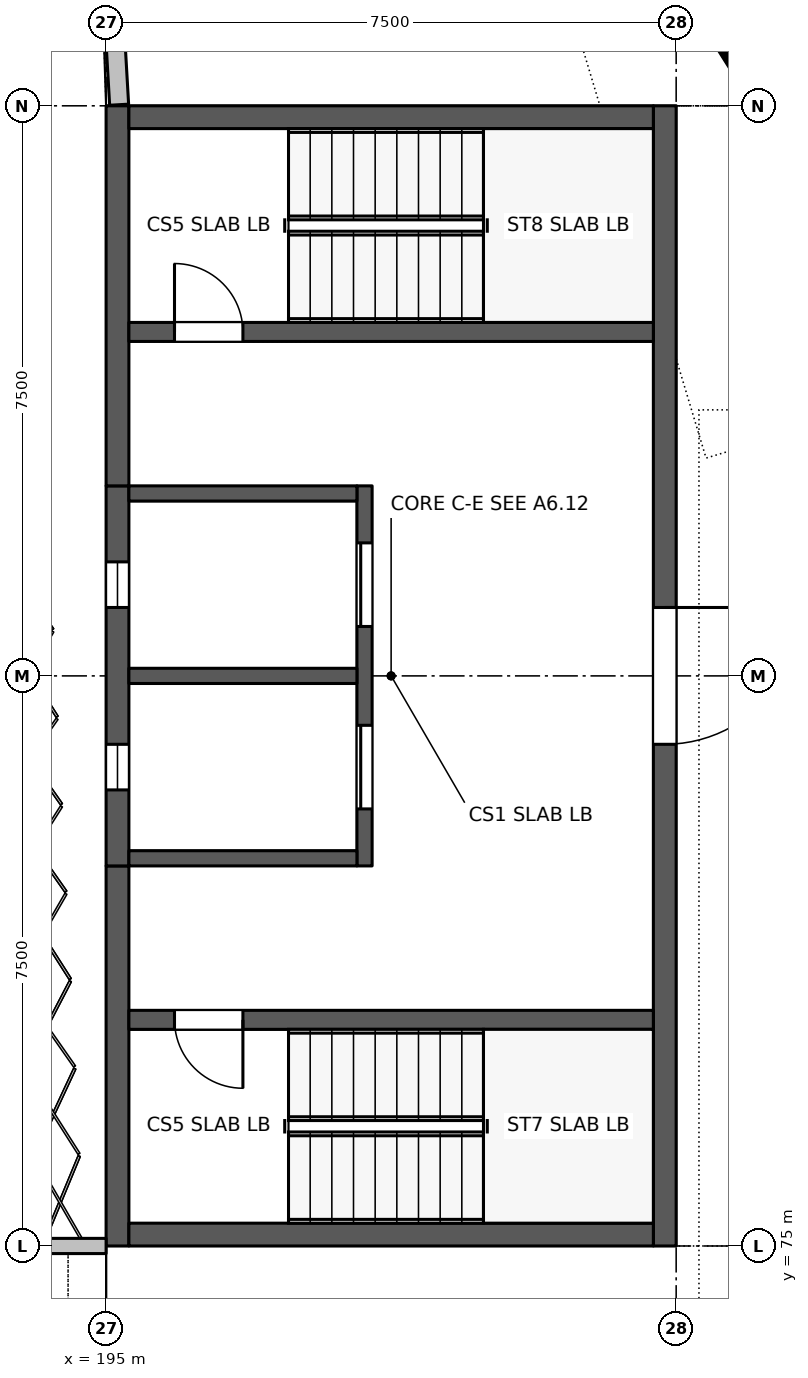
"""IFC4 building model, lengths in metres.
Left out: names, types, materials, properties, quantities, classifications, styles, units other than length and angle.
Written with IfcOpenShell. Run it as: python <this file> out.ifc"""

import sys

from ifc_helpers import new_model, si_unit, direction, frame, frame_2d, origin, place, context, subcontext, project, spatial, rectangle, extrude, element, fill, save


model = new_model("IFC4")
c1 = context("Model", 3, precision=1e-05, world=origin(), true_north=direction((0.0, 1.0)))
c2 = subcontext(c1, "Body", "Model", "MODEL_VIEW")
j1 = project(units=[si_unit("LENGTHUNIT", "METRE"), si_unit("PLANEANGLEUNIT", "RADIAN")], contexts=[c1])
p1 = place(None, origin())
s1 = spatial("IfcSite", under=j1, at=p1, CompositionType="ELEMENT")
p2 = place(p1, origin())
s2 = spatial("IfcBuilding", under=s1, at=p2, CompositionType="ELEMENT")
p3 = place(p2, frame((0.0, 0.0, 6.6)))
s3 = spatial("IfcBuildingStorey", under=s2, at=p3, CompositionType="ELEMENT", Elevation=6.6)
p4 = place(p3, frame((195.037, 92.356, 0.0), z_axis=(0.0, 0.0, 1.0), x_axis=(0.057361082086, -0.998353497646, 0.0)))
e1 = element("IfcWall", 1, at=p4, inside=s3, PredefinedType="SOLIDWALL", context=c2, shape_type="SweptSolid", body=[
    extrude(rectangle(XDim=2.345, YDim=0.25, at=frame_2d((1.173, 0.0))), origin(), (0.0, 0.0, 1.0), 1.1),
])
p5 = place(p3, frame((187.654, 75.0, 0.0), z_axis=(0.0, 0.0, 1.0), x_axis=(1.0, 0.0, 0.0)))
e2 = element("IfcWall", 2, at=p5, inside=s3, PredefinedType="SOLIDWALL", context=c2, shape_type="SweptSolid", body=[
    extrude(rectangle(XDim=7.346, YDim=0.2, at=frame_2d((3.673, 0.0))), origin(), (0.0, 0.0, 1.0), 2.627),
])
p6 = place(p5, frame((0.849, 0.0, 0.9)))
e3 = element("IfcOpeningElement", 3, at=p6, cuts=e2, PredefinedType="OPENING", context=c2, shape_type="SweptSolid", body=[
    extrude(rectangle(XDim=2.4, YDim=1.5, at=frame_2d((1.2, 0.75))), frame((0.0, 0.11, 0.0), z_axis=(0.0, -1.0, 0.0), x_axis=(1.0, 0.0, 0.0)), (0.0, 0.0, 1.0), 0.22),
])
p7 = place(p5, frame((4.098, 0.0, 0.9)))
e4 = element("IfcOpeningElement", 4, at=p7, cuts=e2, PredefinedType="OPENING", context=c2, shape_type="SweptSolid", body=[
    extrude(rectangle(XDim=2.4, YDim=1.5, at=frame_2d((1.2, 0.75))), frame((0.0, 0.11, 0.0), z_axis=(0.0, -1.0, 0.0), x_axis=(1.0, 0.0, 0.0)), (0.0, 0.0, 1.0), 0.22),
])
p8 = place(p3, frame((202.35, 90.0, 0.0), z_axis=(0.0, 0.0, 1.0), x_axis=(0.0, -1.0, 0.0)))
e5 = element("IfcWall", 5, at=p8, inside=s3, PredefinedType="SHEAR", context=c2, shape_type="SweptSolid", body=[
    extrude(rectangle(XDim=15.0, YDim=0.3, at=frame_2d((7.5, 0.0))), origin(), (0.0, 0.0, 1.0), 3.3),
])
p9 = place(p8, frame((6.6, 0.0, 0.0)))
e6 = element("IfcOpeningElement", 6, at=p9, cuts=e5, PredefinedType="OPENING", context=c2, shape_type="SweptSolid", body=[
    extrude(rectangle(XDim=1.8, YDim=2.1, at=frame_2d((0.9, 1.05))), frame((0.0, 0.16, 0.0), z_axis=(0.0, -1.0, 0.0), x_axis=(1.0, 0.0, 0.0)), (0.0, 0.0, 1.0), 0.32),
])
p10 = place(p3, frame((195.15, 75.0, 0.0), z_axis=(0.0, 0.0, 1.0), x_axis=(0.0, 1.0, 0.0)))
e7 = element("IfcWall", 7, at=p10, inside=s3, PredefinedType="SHEAR", context=c2, shape_type="SweptSolid", body=[
    extrude(rectangle(XDim=5.0, YDim=0.3, at=frame_2d((2.5, 0.0))), origin(), (0.0, 0.0, 1.0), 3.3),
])
p11 = place(p3, frame((195.15, 80.0, 0.0), z_axis=(0.0, 0.0, 1.0), x_axis=(0.0, 1.0, 0.0)))
e8 = element("IfcWall", 8, at=p11, inside=s3, PredefinedType="SHEAR", context=c2, shape_type="SweptSolid", body=[
    extrude(rectangle(XDim=5.0, YDim=0.3, at=frame_2d((2.5, 0.0))), origin(), (0.0, 0.0, 1.0), 3.3),
])
p12 = place(p11, frame((1.0, 0.0, 0.3)))
e9 = element("IfcOpeningElement", 9, at=p12, cuts=e8, PredefinedType="OPENING", context=c2, shape_type="SweptSolid", body=[
    extrude(rectangle(XDim=0.6, YDim=2.7, at=frame_2d((0.3, 1.35))), frame((0.0, 0.16, 0.0), z_axis=(0.0, -1.0, 0.0), x_axis=(1.0, 0.0, 0.0)), (0.0, 0.0, 1.0), 0.32),
])
p13 = place(p11, frame((3.4, 0.0, 0.3)))
e10 = element("IfcOpeningElement", 10, at=p13, cuts=e8, PredefinedType="OPENING", context=c2, shape_type="SweptSolid", body=[
    extrude(rectangle(XDim=0.6, YDim=2.7, at=frame_2d((0.3, 1.35))), frame((0.0, 0.16, 0.0), z_axis=(0.0, -1.0, 0.0), x_axis=(1.0, 0.0, 0.0)), (0.0, 0.0, 1.0), 0.32),
])
p14 = place(p3, frame((195.15, 85.0, 0.0), z_axis=(0.0, 0.0, 1.0), x_axis=(0.0, 1.0, 0.0)))
e11 = element("IfcWall", 11, at=p14, inside=s3, PredefinedType="SHEAR", context=c2, shape_type="SweptSolid", body=[
    extrude(rectangle(XDim=5.0, YDim=0.3, at=frame_2d((2.5, 0.0))), origin(), (0.0, 0.0, 1.0), 3.3),
])
for number, where, z_axis, x_axis in (
    (12, (202.2, 75.15, 0.0), (0.0, 0.0, 1.0), (-1.0, 0.0, 0.0)),
    (13, (202.2, 89.85, 0.0), (0.0, 0.0, 1.0), (-1.0, 0.0, 0.0)),
):
    element("IfcWall", number, at=place(p3, frame(where, z_axis=z_axis, x_axis=x_axis)), inside=s3, PredefinedType="SHEAR", context=c2, shape_type="SweptSolid", body=[
        extrude(rectangle(XDim=6.9, YDim=0.3, at=frame_2d((3.45, 0.0))), origin(), (0.0, 0.0, 1.0), 3.3),
    ])
p15 = place(p3, frame((202.2, 77.975, 0.0), z_axis=(0.0, 0.0, 1.0), x_axis=(-1.0, 0.0, 0.0)))
e14 = element("IfcWall", 14, at=p15, inside=s3, PredefinedType="STANDARD", context=c2, shape_type="SweptSolid", body=[
    extrude(rectangle(XDim=6.9, YDim=0.25, at=frame_2d((3.45, 0.0))), origin(), (0.0, 0.0, 1.0), 3.1),
])
p16 = place(p15, frame((5.4, 0.0, 0.0)))
e15 = element("IfcOpeningElement", 15, at=p16, cuts=e14, PredefinedType="OPENING", context=c2, shape_type="SweptSolid", body=[
    extrude(rectangle(XDim=0.9, YDim=2.1, at=frame_2d((0.45, 1.05))), frame((0.0, 0.135, 0.0), z_axis=(0.0, -1.0, 0.0), x_axis=(1.0, 0.0, 0.0)), (0.0, 0.0, 1.0), 0.27),
])
p17 = place(p3, frame((195.3, 87.025, 0.0), z_axis=(0.0, 0.0, 1.0), x_axis=(1.0, 0.0, 0.0)))
e16 = element("IfcWall", 16, at=p17, inside=s3, PredefinedType="STANDARD", context=c2, shape_type="SweptSolid", body=[
    extrude(rectangle(XDim=6.9, YDim=0.25, at=frame_2d((3.45, 0.0))), origin(), (0.0, 0.0, 1.0), 3.1),
])
p18 = place(p17, frame((0.6, 0.0, 0.0)))
e17 = element("IfcOpeningElement", 17, at=p18, cuts=e16, PredefinedType="OPENING", context=c2, shape_type="SweptSolid", body=[
    extrude(rectangle(XDim=0.9, YDim=2.1, at=frame_2d((0.45, 1.05))), frame((0.0, 0.135, 0.0), z_axis=(0.0, -1.0, 0.0), x_axis=(1.0, 0.0, 0.0)), (0.0, 0.0, 1.0), 0.27),
])
p19 = place(p3, frame((198.4, 80.0, 0.0), z_axis=(0.0, 0.0, 1.0), x_axis=(0.0, 1.0, 0.0)))
e18 = element("IfcWall", 18, at=p19, inside=s3, PredefinedType="STANDARD", context=c2, shape_type="SweptSolid", body=[
    extrude(rectangle(XDim=5.0, YDim=0.2, at=frame_2d((2.5, 0.0))), origin(), (0.0, 0.0, 1.0), 3.1),
])
p20 = place(p19, frame((0.75, 0.0, 0.0)))
e19 = element("IfcOpeningElement", 19, at=p20, cuts=e18, PredefinedType="OPENING", context=c2, shape_type="SweptSolid", body=[
    extrude(rectangle(XDim=1.1, YDim=2.1, at=frame_2d((0.55, 1.05))), frame((0.0, 0.11, 0.0), z_axis=(0.0, -1.0, 0.0), x_axis=(1.0, 0.0, 0.0)), (0.0, 0.0, 1.0), 0.22),
])
p21 = place(p19, frame((3.15, 0.0, 0.0)))
e20 = element("IfcOpeningElement", 20, at=p21, cuts=e18, PredefinedType="OPENING", context=c2, shape_type="SweptSolid", body=[
    extrude(rectangle(XDim=1.1, YDim=2.1, at=frame_2d((0.55, 1.05))), frame((0.0, 0.11, 0.0), z_axis=(0.0, -1.0, 0.0), x_axis=(1.0, 0.0, 0.0)), (0.0, 0.0, 1.0), 0.22),
])
for number, where, z_axis, x_axis in (
    (21, (198.3, 80.1, 0.0), (0.0, 0.0, 1.0), (-1.0, 0.0, 0.0)),
    (22, (198.3, 82.5, 0.0), (0.0, 0.0, 1.0), (-1.0, 0.0, 0.0)),
    (23, (198.3, 84.9, 0.0), (0.0, 0.0, 1.0), (-1.0, 0.0, 0.0)),
):
    element("IfcWall", number, at=place(p3, frame(where, z_axis=z_axis, x_axis=x_axis)), inside=s3, PredefinedType="STANDARD", context=c2, shape_type="SweptSolid", body=[
        extrude(rectangle(XDim=3.0, YDim=0.2, at=frame_2d((1.5, 0.0))), origin(), (0.0, 0.0, 1.0), 3.1),
    ])
p22 = place(p9, origin())
e24 = element("IfcDoor", 24, at=p22, inside=s3, OperationType="DOUBLE_DOOR_SINGLE_SWING", PredefinedType="DOOR", context=c2, shape_type="SweptSolid", body=[
    extrude(rectangle(XDim=1.8, YDim=2.1, at=frame_2d((0.9, 1.05))), frame((0.0, 0.025, 0.0), z_axis=(0.0, -1.0, 0.0), x_axis=(1.0, 0.0, 0.0)), (0.0, 0.0, 1.0), 0.05),
])
fill(e6, e24)
p23 = place(p16, origin())
e25 = element("IfcDoor", 25, at=p23, inside=s3, OperationType="SINGLE_SWING_LEFT", PredefinedType="DOOR", context=c2, shape_type="SweptSolid", body=[
    extrude(rectangle(XDim=0.9, YDim=2.1, at=frame_2d((0.45, 1.05))), frame((0.0, 0.025, 0.0), z_axis=(0.0, -1.0, 0.0), x_axis=(1.0, 0.0, 0.0)), (0.0, 0.0, 1.0), 0.05),
])
fill(e15, e25)
p24 = place(p18, origin())
e26 = element("IfcDoor", 26, at=p24, inside=s3, OperationType="SINGLE_SWING_RIGHT", PredefinedType="DOOR", context=c2, shape_type="SweptSolid", body=[
    extrude(rectangle(XDim=0.9, YDim=2.1, at=frame_2d((0.45, 1.05))), frame((0.0, 0.025, 0.0), z_axis=(0.0, -1.0, 0.0), x_axis=(1.0, 0.0, 0.0)), (0.0, 0.0, 1.0), 0.05),
])
fill(e17, e26)
p25 = place(p20, origin())
e27 = element("IfcDoor", 27, at=p25, inside=s3, OperationType="DOUBLE_DOOR_SLIDING", PredefinedType="DOOR", context=c2, shape_type="SweptSolid", body=[
    extrude(rectangle(XDim=1.1, YDim=2.1, at=frame_2d((0.55, 1.05))), frame((0.0, 0.025, 0.0), z_axis=(0.0, -1.0, 0.0), x_axis=(1.0, 0.0, 0.0)), (0.0, 0.0, 1.0), 0.05),
])
fill(e19, e27)
p26 = place(p21, origin())
e28 = element("IfcDoor", 28, at=p26, inside=s3, OperationType="DOUBLE_DOOR_SLIDING", PredefinedType="DOOR", context=c2, shape_type="SweptSolid", body=[
    extrude(rectangle(XDim=1.1, YDim=2.1, at=frame_2d((0.55, 1.05))), frame((0.0, 0.025, 0.0), z_axis=(0.0, -1.0, 0.0), x_axis=(1.0, 0.0, 0.0)), (0.0, 0.0, 1.0), 0.05),
])
fill(e20, e28)
p27 = place(p12, origin())
e29 = element("IfcWindow", 29, at=p27, inside=s3, PartitioningType="SINGLE_PANEL", PredefinedType="WINDOW", context=c2, shape_type="SweptSolid", body=[
    extrude(rectangle(XDim=0.6, YDim=2.7, at=frame_2d((0.3, 1.35))), frame((0.0, 0.03, 0.0), z_axis=(0.0, -1.0, 0.0), x_axis=(1.0, 0.0, 0.0)), (0.0, 0.0, 1.0), 0.06),
])
fill(e9, e29)
p28 = place(p13, origin())
e30 = element("IfcWindow", 30, at=p28, inside=s3, PartitioningType="SINGLE_PANEL", PredefinedType="WINDOW", context=c2, shape_type="SweptSolid", body=[
    extrude(rectangle(XDim=0.6, YDim=2.7, at=frame_2d((0.3, 1.35))), frame((0.0, 0.03, 0.0), z_axis=(0.0, -1.0, 0.0), x_axis=(1.0, 0.0, 0.0)), (0.0, 0.0, 1.0), 0.06),
])
fill(e10, e30)
save(model, sys.argv[1])
